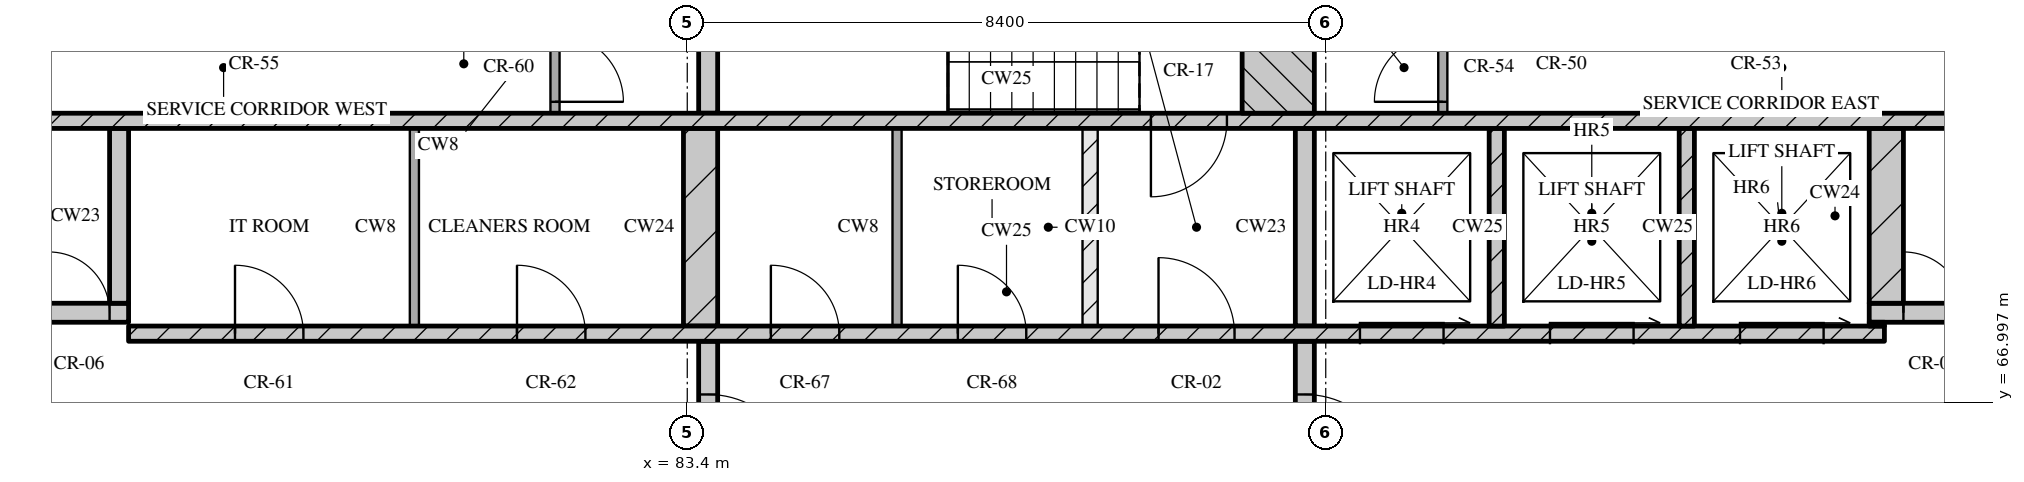
"""IFC4 building model, lengths in metres.
Left out: names, types, materials, properties, quantities, classifications, styles, units other than length and angle.
Written with IfcOpenShell. Run it as: python <this file> out.ifc"""

import sys

from ifc_helpers import new_model, si_unit, direction, frame, frame_2d, origin, place, context, subcontext, project, spatial, rectangle, extrude, element, fill, save


model = new_model("IFC4")
c1 = context("Model", 3, precision=1e-05, world=origin(), true_north=direction((0.0, 1.0)))
c2 = subcontext(c1, "Body", "Model", "MODEL_VIEW")
j1 = project(units=[si_unit("LENGTHUNIT", "METRE"), si_unit("PLANEANGLEUNIT", "RADIAN")], contexts=[c1])
p1 = place(None, origin())
s1 = spatial("IfcSite", under=j1, at=p1, CompositionType="ELEMENT")
p2 = place(p1, origin())
s2 = spatial("IfcBuilding", under=s1, at=p2, CompositionType="ELEMENT")
p3 = place(p2, frame((0.0, 0.0, 299.55)))
s3 = spatial("IfcBuildingStorey", under=s2, at=p3, CompositionType="ELEMENT", Elevation=299.55)
p4 = place(p3, frame((83.675, 65.2, 0.0), z_axis=(0.0, 0.0, 1.0), x_axis=(0.0, 1.0, 0.0)))
e1 = element("IfcWall", 1, at=p4, inside=s3, PredefinedType="SOLIDWALL", context=c2, shape_type="SweptSolid", body=[
    extrude(rectangle(XDim=2.6, YDim=0.25, at=frame_2d((1.3, 0.0))), origin(), (0.0, 0.0, 1.0), 3.32),
])
p5 = place(p4, frame((0.7, 0.0, 0.0)))
e2 = element("IfcOpeningElement", 2, at=p5, cuts=e1, PredefinedType="OPENING", context=c2, shape_type="SweptSolid", body=[
    extrude(rectangle(XDim=1.2, YDim=2.1, at=frame_2d((0.6, 1.05))), frame((0.0, 0.135, 0.0), z_axis=(0.0, -1.0, 0.0), x_axis=(1.0, 0.0, 0.0)), (0.0, 0.0, 1.0), 0.27),
])
p6 = place(p3, frame((91.525, 65.2, 0.0), z_axis=(0.0, 0.0, 1.0), x_axis=(0.0, 1.0, 0.0)))
e3 = element("IfcWall", 3, at=p6, inside=s3, PredefinedType="SOLIDWALL", context=c2, shape_type="SweptSolid", body=[
    extrude(rectangle(XDim=2.6, YDim=0.25, at=frame_2d((1.3, 0.0))), origin(), (0.0, 0.0, 1.0), 3.32),
])
p7 = place(p6, frame((0.7, 0.0, 0.0)))
e4 = element("IfcOpeningElement", 4, at=p7, cuts=e3, PredefinedType="OPENING", context=c2, shape_type="SweptSolid", body=[
    extrude(rectangle(XDim=1.2, YDim=2.1, at=frame_2d((0.6, 1.05))), frame((0.0, 0.135, 0.0), z_axis=(0.0, -1.0, 0.0), x_axis=(1.0, 0.0, 0.0)), (0.0, 0.0, 1.0), 0.27),
])
p8 = place(p3, frame((76.05, 67.9, 0.0), z_axis=(0.0, 0.0, 1.0), x_axis=(1.0, 0.0, 0.0)))
e5 = element("IfcWall", 5, at=p8, inside=s3, PredefinedType="SOLIDWALL", context=c2, shape_type="SweptSolid", body=[
    extrude(rectangle(XDim=23.1, YDim=0.2, at=frame_2d((11.55, 0.0))), origin(), (0.0, 0.0, 1.0), 3.32),
])
p9 = place(p8, frame((1.4, 0.0, 0.0)))
e6 = element("IfcOpeningElement", 6, at=p9, cuts=e5, PredefinedType="OPENING", context=c2, shape_type="SweptSolid", body=[
    extrude(rectangle(XDim=0.9, YDim=2.1, at=frame_2d((0.45, 1.05))), frame((0.0, 0.11, 0.0), z_axis=(0.0, -1.0, 0.0), x_axis=(1.0, 0.0, 0.0)), (0.0, 0.0, 1.0), 0.22),
])
p10 = place(p8, frame((5.11, 0.0, 0.0)))
e7 = element("IfcOpeningElement", 7, at=p10, cuts=e5, PredefinedType="OPENING", context=c2, shape_type="SweptSolid", body=[
    extrude(rectangle(XDim=0.9, YDim=2.1, at=frame_2d((0.45, 1.05))), frame((0.0, 0.11, 0.0), z_axis=(0.0, -1.0, 0.0), x_axis=(1.0, 0.0, 0.0)), (0.0, 0.0, 1.0), 0.22),
])
p11 = place(p8, frame((8.45, 0.0, 0.0)))
e8 = element("IfcOpeningElement", 8, at=p11, cuts=e5, PredefinedType="OPENING", context=c2, shape_type="SweptSolid", body=[
    extrude(rectangle(XDim=0.9, YDim=2.1, at=frame_2d((0.45, 1.05))), frame((0.0, 0.11, 0.0), z_axis=(0.0, -1.0, 0.0), x_axis=(1.0, 0.0, 0.0)), (0.0, 0.0, 1.0), 0.22),
])
p12 = place(p8, frame((10.91, 0.0, 0.0)))
e9 = element("IfcOpeningElement", 9, at=p12, cuts=e5, PredefinedType="OPENING", context=c2, shape_type="SweptSolid", body=[
    extrude(rectangle(XDim=0.9, YDim=2.1, at=frame_2d((0.45, 1.05))), frame((0.0, 0.11, 0.0), z_axis=(0.0, -1.0, 0.0), x_axis=(1.0, 0.0, 0.0)), (0.0, 0.0, 1.0), 0.22),
])
p13 = place(p8, frame((13.55, 0.0, 0.0)))
e10 = element("IfcOpeningElement", 10, at=p13, cuts=e5, PredefinedType="OPENING", context=c2, shape_type="SweptSolid", body=[
    extrude(rectangle(XDim=1.0, YDim=2.1, at=frame_2d((0.5, 1.05))), frame((0.0, 0.11, 0.0), z_axis=(0.0, -1.0, 0.0), x_axis=(1.0, 0.0, 0.0)), (0.0, 0.0, 1.0), 0.22),
])
p14 = place(p8, frame((16.2, 0.0, 0.0)))
e11 = element("IfcOpeningElement", 11, at=p14, cuts=e5, PredefinedType="OPENING", context=c2, shape_type="SweptSolid", body=[
    extrude(rectangle(XDim=1.1, YDim=2.1, at=frame_2d((0.55, 1.05))), frame((0.0, 0.11, 0.0), z_axis=(0.0, -1.0, 0.0), x_axis=(1.0, 0.0, 0.0)), (0.0, 0.0, 1.0), 0.22),
])
p15 = place(p8, frame((18.7, 0.0, 0.0)))
e12 = element("IfcOpeningElement", 12, at=p15, cuts=e5, PredefinedType="OPENING", context=c2, shape_type="SweptSolid", body=[
    extrude(rectangle(XDim=1.1, YDim=2.1, at=frame_2d((0.55, 1.05))), frame((0.0, 0.11, 0.0), z_axis=(0.0, -1.0, 0.0), x_axis=(1.0, 0.0, 0.0)), (0.0, 0.0, 1.0), 0.22),
])
p16 = place(p8, frame((21.2, 0.0, 0.0)))
e13 = element("IfcOpeningElement", 13, at=p16, cuts=e5, PredefinedType="OPENING", context=c2, shape_type="SweptSolid", body=[
    extrude(rectangle(XDim=1.1, YDim=2.1, at=frame_2d((0.55, 1.05))), frame((0.0, 0.11, 0.0), z_axis=(0.0, -1.0, 0.0), x_axis=(1.0, 0.0, 0.0)), (0.0, 0.0, 1.0), 0.22),
])
p17 = place(p3, frame((79.81, 68.0, 0.0), z_axis=(0.0, 0.0, 1.0), x_axis=(0.0, 1.0, 0.0)))
e14 = element("IfcWall", 14, at=p17, inside=s3, PredefinedType="PARTITIONING", context=c2, shape_type="SweptSolid", body=[
    extrude(rectangle(XDim=2.6, YDim=0.12, at=frame_2d((1.3, 0.0))), origin(), (0.0, 0.0, 1.0), 3.32),
])
p18 = place(p3, frame((83.575, 68.0, 0.0), z_axis=(0.0, 0.0, 1.0), x_axis=(0.0, 1.0, 0.0)))
e15 = element("IfcWall", 15, at=p18, inside=s3, PredefinedType="SOLIDWALL", context=c2, shape_type="SweptSolid", body=[
    extrude(rectangle(XDim=2.6, YDim=0.45, at=frame_2d((1.3, 0.0))), origin(), (0.0, 0.0, 1.0), 3.32),
])
p19 = place(p3, frame((86.16, 68.0, 0.0), z_axis=(0.0, 0.0, 1.0), x_axis=(0.0, 1.0, 0.0)))
e16 = element("IfcWall", 16, at=p19, inside=s3, PredefinedType="PARTITIONING", context=c2, shape_type="SweptSolid", body=[
    extrude(rectangle(XDim=2.6, YDim=0.12, at=frame_2d((1.3, 0.0))), origin(), (0.0, 0.0, 1.0), 3.32),
])
p20 = place(p3, frame((88.7, 68.0, 0.0), z_axis=(0.0, 0.0, 1.0), x_axis=(0.0, 1.0, 0.0)))
e17 = element("IfcWall", 17, at=p20, inside=s3, PredefinedType="PARTITIONING", context=c2, shape_type="SweptSolid", body=[
    extrude(rectangle(XDim=2.6, YDim=0.2, at=frame_2d((1.3, 0.0))), origin(), (0.0, 0.0, 1.0), 3.32),
])
p21 = place(p3, frame((91.525, 68.0, 0.0), z_axis=(0.0, 0.0, 1.0), x_axis=(0.0, 1.0, 0.0)))
e18 = element("IfcWall", 18, at=p21, inside=s3, PredefinedType="SOLIDWALL", context=c2, shape_type="SweptSolid", body=[
    extrude(rectangle(XDim=2.6, YDim=0.25, at=frame_2d((1.3, 0.0))), origin(), (0.0, 0.0, 1.0), 3.32),
])
for number, where, z_axis, x_axis in (
    (19, (94.05, 68.0, 0.0), (0.0, 0.0, 1.0), (0.0, 1.0, 0.0)),
    (20, (96.55, 68.0, 0.0), (0.0, 0.0, 1.0), (0.0, 1.0, 0.0)),
):
    element("IfcWall", number, at=place(p3, frame(where, z_axis=z_axis, x_axis=x_axis)), inside=s3, PredefinedType="SOLIDWALL", context=c2, shape_type="SweptSolid", body=[
        extrude(rectangle(XDim=2.6, YDim=0.2, at=frame_2d((1.3, 0.0))), origin(), (0.0, 0.0, 1.0), 3.32),
    ])
p22 = place(p3, frame((98.95, 68.025, 0.0), z_axis=(0.0, 0.0, 1.0), x_axis=(1.0, 0.0, 0.0)))
e21 = element("IfcWall", 21, at=p22, inside=s3, PredefinedType="SOLIDWALL", context=c2, shape_type="SweptSolid", body=[
    extrude(rectangle(XDim=0.2, YDim=0.05, at=frame_2d((0.1, 0.0))), origin(), (0.0, 0.0, 1.0), 3.32),
])
p23 = place(p3, frame((67.8, 68.175, 0.0), z_axis=(0.0, 0.0, 1.0), x_axis=(1.0, 0.0, 0.0)))
e22 = element("IfcWall", 22, at=p23, inside=s3, PredefinedType="SOLIDWALL", context=c2, shape_type="SweptSolid", body=[
    extrude(rectangle(XDim=8.25, YDim=0.25, at=frame_2d((4.125, 0.0))), origin(), (0.0, 0.0, 1.0), 3.32),
])
p24 = place(p23, frame((5.7, 0.0, 0.0)))
e23 = element("IfcOpeningElement", 23, at=p24, cuts=e22, PredefinedType="OPENING", context=c2, shape_type="SweptSolid", body=[
    extrude(rectangle(XDim=1.0, YDim=2.1, at=frame_2d((0.5, 1.05))), frame((0.0, 0.135, 0.0), z_axis=(0.0, -1.0, 0.0), x_axis=(1.0, 0.0, 0.0)), (0.0, 0.0, 1.0), 0.27),
])
p25 = place(p23, frame((7.2, 0.0, 0.0)))
e24 = element("IfcOpeningElement", 24, at=p25, cuts=e22, PredefinedType="OPENING", context=c2, shape_type="SweptSolid", body=[
    extrude(rectangle(XDim=0.8, YDim=2.1, at=frame_2d((0.4, 1.05))), frame((0.0, 0.135, 0.0), z_axis=(0.0, -1.0, 0.0), x_axis=(1.0, 0.0, 0.0)), (0.0, 0.0, 1.0), 0.27),
])
p26 = place(p3, frame((98.95, 68.175, 0.0), z_axis=(0.0, 0.0, 1.0), x_axis=(1.0, 0.0, 0.0)))
e25 = element("IfcWall", 25, at=p26, inside=s3, PredefinedType="SOLIDWALL", context=c2, shape_type="SweptSolid", body=[
    extrude(rectangle(XDim=8.45, YDim=0.25, at=frame_2d((4.225, 0.0))), origin(), (0.0, 0.0, 1.0), 3.32),
])
p27 = place(p26, frame((0.45, 0.0, 0.0)))
e26 = element("IfcOpeningElement", 26, at=p27, cuts=e25, PredefinedType="OPENING", context=c2, shape_type="SweptSolid", body=[
    extrude(rectangle(XDim=0.8, YDim=2.1, at=frame_2d((0.4, 1.05))), frame((0.0, 0.135, 0.0), z_axis=(0.0, -1.0, 0.0), x_axis=(1.0, 0.0, 0.0)), (0.0, 0.0, 1.0), 0.27),
])
p28 = place(p26, frame((1.75, 0.0, 0.0)))
e27 = element("IfcOpeningElement", 27, at=p28, cuts=e25, PredefinedType="OPENING", context=c2, shape_type="SweptSolid", body=[
    extrude(rectangle(XDim=1.0, YDim=2.1, at=frame_2d((0.5, 1.05))), frame((0.0, 0.135, 0.0), z_axis=(0.0, -1.0, 0.0), x_axis=(1.0, 0.0, 0.0)), (0.0, 0.0, 1.0), 0.27),
])
p29 = place(p3, frame((75.925, 68.3, 0.0), z_axis=(0.0, 0.0, 1.0), x_axis=(0.0, 1.0, 0.0)))
e28 = element("IfcWall", 28, at=p29, inside=s3, PredefinedType="SOLIDWALL", context=c2, shape_type="SweptSolid", body=[
    extrude(rectangle(XDim=2.3, YDim=0.25, at=frame_2d((1.15, 0.0))), origin(), (0.0, 0.0, 1.0), 3.32),
])
p30 = place(p3, frame((99.175, 68.3, 0.0), z_axis=(0.0, 0.0, 1.0), x_axis=(0.0, 1.0, 0.0)))
e29 = element("IfcWall", 29, at=p30, inside=s3, PredefinedType="SOLIDWALL", context=c2, shape_type="SweptSolid", body=[
    extrude(rectangle(XDim=2.3, YDim=0.45, at=frame_2d((1.15, 0.0))), origin(), (0.0, 0.0, 1.0), 3.32),
])
p31 = place(p3, frame((67.8, 70.7, 0.0), z_axis=(0.0, 0.0, 1.0), x_axis=(1.0, 0.0, 0.0)))
e30 = element("IfcWall", 30, at=p31, inside=s3, PredefinedType="SOLIDWALL", context=c2, shape_type="SweptSolid", body=[
    extrude(rectangle(XDim=39.6, YDim=0.2, at=frame_2d((19.8, 0.0))), origin(), (0.0, 0.0, 1.0), 3.32),
])
p32 = place(p31, frame((0.65, 0.0, 0.0)))
e31 = element("IfcOpeningElement", 31, at=p32, cuts=e30, PredefinedType="OPENING", context=c2, shape_type="SweptSolid", body=[
    extrude(rectangle(XDim=1.1, YDim=2.1, at=frame_2d((0.55, 1.05))), frame((0.0, 0.11, 0.0), z_axis=(0.0, -1.0, 0.0), x_axis=(1.0, 0.0, 0.0)), (0.0, 0.0, 1.0), 0.22),
])
p33 = place(p31, frame((3.25, 0.0, 0.0)))
e32 = element("IfcOpeningElement", 32, at=p33, cuts=e30, PredefinedType="OPENING", context=c2, shape_type="SweptSolid", body=[
    extrude(rectangle(XDim=1.1, YDim=2.1, at=frame_2d((0.55, 1.05))), frame((0.0, 0.11, 0.0), z_axis=(0.0, -1.0, 0.0), x_axis=(1.0, 0.0, 0.0)), (0.0, 0.0, 1.0), 0.22),
])
p34 = place(p31, frame((5.9, 0.0, 0.0)))
e33 = element("IfcOpeningElement", 33, at=p34, cuts=e30, PredefinedType="OPENING", context=c2, shape_type="SweptSolid", body=[
    extrude(rectangle(XDim=1.0, YDim=2.1, at=frame_2d((0.5, 1.05))), frame((0.0, 0.11, 0.0), z_axis=(0.0, -1.0, 0.0), x_axis=(1.0, 0.0, 0.0)), (0.0, 0.0, 1.0), 0.22),
])
p35 = place(p31, frame((21.7, 0.0, 0.0)))
e34 = element("IfcOpeningElement", 34, at=p35, cuts=e30, PredefinedType="OPENING", context=c2, shape_type="SweptSolid", body=[
    extrude(rectangle(XDim=1.0, YDim=2.1, at=frame_2d((0.5, 1.05))), frame((0.0, 0.11, 0.0), z_axis=(0.0, -1.0, 0.0), x_axis=(1.0, 0.0, 0.0)), (0.0, 0.0, 1.0), 0.22),
])
p36 = place(p31, frame((32.7, 0.0, 0.0)))
e35 = element("IfcOpeningElement", 35, at=p36, cuts=e30, PredefinedType="OPENING", context=c2, shape_type="SweptSolid", body=[
    extrude(rectangle(XDim=1.0, YDim=2.1, at=frame_2d((0.5, 1.05))), frame((0.0, 0.11, 0.0), z_axis=(0.0, -1.0, 0.0), x_axis=(1.0, 0.0, 0.0)), (0.0, 0.0, 1.0), 0.22),
])
p37 = place(p31, frame((35.25, 0.0, 0.0)))
e36 = element("IfcOpeningElement", 36, at=p37, cuts=e30, PredefinedType="OPENING", context=c2, shape_type="SweptSolid", body=[
    extrude(rectangle(XDim=1.1, YDim=2.1, at=frame_2d((0.55, 1.05))), frame((0.0, 0.11, 0.0), z_axis=(0.0, -1.0, 0.0), x_axis=(1.0, 0.0, 0.0)), (0.0, 0.0, 1.0), 0.22),
])
p38 = place(p31, frame((37.85, 0.0, 0.0)))
e37 = element("IfcOpeningElement", 37, at=p38, cuts=e30, PredefinedType="OPENING", context=c2, shape_type="SweptSolid", body=[
    extrude(rectangle(XDim=1.1, YDim=2.1, at=frame_2d((0.55, 1.05))), frame((0.0, 0.11, 0.0), z_axis=(0.0, -1.0, 0.0), x_axis=(1.0, 0.0, 0.0)), (0.0, 0.0, 1.0), 0.22),
])
p39 = place(p3, frame((81.66, 70.8, 0.0), z_axis=(0.0, 0.0, 1.0), x_axis=(0.0, 1.0, 0.0)))
e38 = element("IfcWall", 38, at=p39, inside=s3, PredefinedType="PARTITIONING", context=c2, shape_type="SweptSolid", body=[
    extrude(rectangle(XDim=1.2, YDim=0.12, at=frame_2d((0.6, 0.0))), origin(), (0.0, 0.0, 1.0), 3.32),
])
p40 = place(p39, frame((0.15, 0.0, 0.0)))
e39 = element("IfcOpeningElement", 39, at=p40, cuts=e38, PredefinedType="OPENING", context=c2, shape_type="SweptSolid", body=[
    extrude(rectangle(XDim=0.9, YDim=2.1, at=frame_2d((0.45, 1.05))), frame((0.0, 0.07, 0.0), z_axis=(0.0, -1.0, 0.0), x_axis=(1.0, 0.0, 0.0)), (0.0, 0.0, 1.0), 0.14),
])
p41 = place(p3, frame((83.675, 70.8, 0.0), z_axis=(0.0, 0.0, 1.0), x_axis=(0.0, 1.0, 0.0)))
e40 = element("IfcWall", 40, at=p41, inside=s3, PredefinedType="SOLIDWALL", context=c2, shape_type="SweptSolid", body=[
    extrude(rectangle(XDim=2.95, YDim=0.25, at=frame_2d((1.475, 0.0))), origin(), (0.0, 0.0, 1.0), 3.32),
])
p42 = place(p3, frame((91.175, 70.8, 0.0), z_axis=(0.0, 0.0, 1.0), x_axis=(0.0, 1.0, 0.0)))
e41 = element("IfcWall", 41, at=p42, inside=s3, PredefinedType="SOLIDWALL", context=c2, shape_type="SweptSolid", body=[
    extrude(rectangle(XDim=2.95, YDim=0.95, at=frame_2d((1.475, 0.0))), origin(), (0.0, 0.0, 1.0), 3.32),
])
p43 = place(p3, frame((93.34, 70.8, 0.0), z_axis=(0.0, 0.0, 1.0), x_axis=(0.0, 1.0, 0.0)))
e42 = element("IfcWall", 42, at=p43, inside=s3, PredefinedType="PARTITIONING", context=c2, shape_type="SweptSolid", body=[
    extrude(rectangle(XDim=1.2, YDim=0.12, at=frame_2d((0.6, 0.0))), origin(), (0.0, 0.0, 1.0), 3.32),
])
p44 = place(p43, frame((0.15, 0.0, 0.0)))
e43 = element("IfcOpeningElement", 43, at=p44, cuts=e42, PredefinedType="OPENING", context=c2, shape_type="SweptSolid", body=[
    extrude(rectangle(XDim=0.9, YDim=2.1, at=frame_2d((0.45, 1.05))), frame((0.0, 0.07, 0.0), z_axis=(0.0, -1.0, 0.0), x_axis=(1.0, 0.0, 0.0)), (0.0, 0.0, 1.0), 0.14),
])
p45 = place(p5, origin())
e44 = element("IfcDoor", 44, at=p45, inside=s3, OperationType="SINGLE_SWING_RIGHT", PredefinedType="DOOR", context=c2, shape_type="SweptSolid", body=[
    extrude(rectangle(XDim=1.2, YDim=2.1, at=frame_2d((0.6, 1.05))), frame((0.0, 0.025, 0.0), z_axis=(0.0, -1.0, 0.0), x_axis=(1.0, 0.0, 0.0)), (0.0, 0.0, 1.0), 0.05),
])
fill(e2, e44)
p46 = place(p7, origin())
e45 = element("IfcDoor", 45, at=p46, inside=s3, OperationType="SINGLE_SWING_RIGHT", PredefinedType="DOOR", context=c2, shape_type="SweptSolid", body=[
    extrude(rectangle(XDim=1.2, YDim=2.1, at=frame_2d((0.6, 1.05))), frame((0.0, 0.025, 0.0), z_axis=(0.0, -1.0, 0.0), x_axis=(1.0, 0.0, 0.0)), (0.0, 0.0, 1.0), 0.05),
])
fill(e4, e45)
p47 = place(p9, origin())
e46 = element("IfcDoor", 46, at=p47, inside=s3, OperationType="SINGLE_SWING_LEFT", PredefinedType="DOOR", context=c2, shape_type="SweptSolid", body=[
    extrude(rectangle(XDim=0.9, YDim=2.1, at=frame_2d((0.45, 1.05))), frame((0.0, 0.025, 0.0), z_axis=(0.0, -1.0, 0.0), x_axis=(1.0, 0.0, 0.0)), (0.0, 0.0, 1.0), 0.05),
])
fill(e6, e46)
p48 = place(p10, origin())
e47 = element("IfcDoor", 47, at=p48, inside=s3, OperationType="SINGLE_SWING_LEFT", PredefinedType="DOOR", context=c2, shape_type="SweptSolid", body=[
    extrude(rectangle(XDim=0.9, YDim=2.1, at=frame_2d((0.45, 1.05))), frame((0.0, 0.025, 0.0), z_axis=(0.0, -1.0, 0.0), x_axis=(1.0, 0.0, 0.0)), (0.0, 0.0, 1.0), 0.05),
])
fill(e7, e47)
p49 = place(p11, origin())
e48 = element("IfcDoor", 48, at=p49, inside=s3, OperationType="SINGLE_SWING_LEFT", PredefinedType="DOOR", context=c2, shape_type="SweptSolid", body=[
    extrude(rectangle(XDim=0.9, YDim=2.1, at=frame_2d((0.45, 1.05))), frame((0.0, 0.025, 0.0), z_axis=(0.0, -1.0, 0.0), x_axis=(1.0, 0.0, 0.0)), (0.0, 0.0, 1.0), 0.05),
])
fill(e8, e48)
p50 = place(p12, origin())
e49 = element("IfcDoor", 49, at=p50, inside=s3, OperationType="SINGLE_SWING_LEFT", PredefinedType="DOOR", context=c2, shape_type="SweptSolid", body=[
    extrude(rectangle(XDim=0.9, YDim=2.1, at=frame_2d((0.45, 1.05))), frame((0.0, 0.025, 0.0), z_axis=(0.0, -1.0, 0.0), x_axis=(1.0, 0.0, 0.0)), (0.0, 0.0, 1.0), 0.05),
])
fill(e9, e49)
p51 = place(p13, origin())
e50 = element("IfcDoor", 50, at=p51, inside=s3, OperationType="SINGLE_SWING_LEFT", PredefinedType="DOOR", context=c2, shape_type="SweptSolid", body=[
    extrude(rectangle(XDim=1.0, YDim=2.1, at=frame_2d((0.5, 1.05))), frame((0.0, 0.025, 0.0), z_axis=(0.0, -1.0, 0.0), x_axis=(1.0, 0.0, 0.0)), (0.0, 0.0, 1.0), 0.05),
])
fill(e10, e50)
p52 = place(p14, origin())
e51 = element("IfcDoor", 51, at=p52, inside=s3, OperationType="SLIDING_TO_RIGHT", PredefinedType="DOOR", context=c2, shape_type="SweptSolid", body=[
    extrude(rectangle(XDim=1.1, YDim=2.1, at=frame_2d((0.55, 1.05))), frame((0.0, 0.025, 0.0), z_axis=(0.0, -1.0, 0.0), x_axis=(1.0, 0.0, 0.0)), (0.0, 0.0, 1.0), 0.05),
])
fill(e11, e51)
p53 = place(p15, origin())
e52 = element("IfcDoor", 52, at=p53, inside=s3, OperationType="SLIDING_TO_RIGHT", PredefinedType="DOOR", context=c2, shape_type="SweptSolid", body=[
    extrude(rectangle(XDim=1.1, YDim=2.1, at=frame_2d((0.55, 1.05))), frame((0.0, 0.025, 0.0), z_axis=(0.0, -1.0, 0.0), x_axis=(1.0, 0.0, 0.0)), (0.0, 0.0, 1.0), 0.05),
])
fill(e12, e52)
p54 = place(p16, origin())
e53 = element("IfcDoor", 53, at=p54, inside=s3, OperationType="SLIDING_TO_RIGHT", PredefinedType="DOOR", context=c2, shape_type="SweptSolid", body=[
    extrude(rectangle(XDim=1.1, YDim=2.1, at=frame_2d((0.55, 1.05))), frame((0.0, 0.025, 0.0), z_axis=(0.0, -1.0, 0.0), x_axis=(1.0, 0.0, 0.0)), (0.0, 0.0, 1.0), 0.05),
])
fill(e13, e53)
p55 = place(p25, origin())
e54 = element("IfcDoor", 54, at=p55, inside=s3, OperationType="SINGLE_SWING_LEFT", PredefinedType="DOOR", context=c2, shape_type="SweptSolid", body=[
    extrude(rectangle(XDim=0.8, YDim=2.1, at=frame_2d((0.4, 1.05))), frame((0.0, 0.025, 0.0), z_axis=(0.0, -1.0, 0.0), x_axis=(1.0, 0.0, 0.0)), (0.0, 0.0, 1.0), 0.05),
])
fill(e24, e54)
p56 = place(p27, origin())
e55 = element("IfcDoor", 55, at=p56, inside=s3, OperationType="SINGLE_SWING_LEFT", PredefinedType="DOOR", context=c2, shape_type="SweptSolid", body=[
    extrude(rectangle(XDim=0.8, YDim=2.1, at=frame_2d((0.4, 1.05))), frame((0.0, 0.025, 0.0), z_axis=(0.0, -1.0, 0.0), x_axis=(1.0, 0.0, 0.0)), (0.0, 0.0, 1.0), 0.05),
])
fill(e26, e55)
p57 = place(p35, origin())
e56 = element("IfcDoor", 56, at=p57, inside=s3, OperationType="SINGLE_SWING_RIGHT", PredefinedType="DOOR", context=c2, shape_type="SweptSolid", body=[
    extrude(rectangle(XDim=1.0, YDim=2.1, at=frame_2d((0.5, 1.05))), frame((0.0, 0.025, 0.0), z_axis=(0.0, -1.0, 0.0), x_axis=(1.0, 0.0, 0.0)), (0.0, 0.0, 1.0), 0.05),
])
fill(e34, e56)
p58 = place(p40, origin())
e57 = element("IfcDoor", 57, at=p58, inside=s3, OperationType="SINGLE_SWING_RIGHT", PredefinedType="DOOR", context=c2, shape_type="SweptSolid", body=[
    extrude(rectangle(XDim=0.9, YDim=2.1, at=frame_2d((0.45, 1.05))), frame((0.0, 0.025, 0.0), z_axis=(0.0, -1.0, 0.0), x_axis=(1.0, 0.0, 0.0)), (0.0, 0.0, 1.0), 0.05),
])
fill(e39, e57)
p59 = place(p44, origin())
e58 = element("IfcDoor", 58, at=p59, inside=s3, OperationType="SINGLE_SWING_LEFT", PredefinedType="DOOR", context=c2, shape_type="SweptSolid", body=[
    extrude(rectangle(XDim=0.9, YDim=2.1, at=frame_2d((0.45, 1.05))), frame((0.0, 0.025, 0.0), z_axis=(0.0, -1.0, 0.0), x_axis=(1.0, 0.0, 0.0)), (0.0, 0.0, 1.0), 0.05),
])
fill(e43, e58)
save(model, sys.argv[1])
